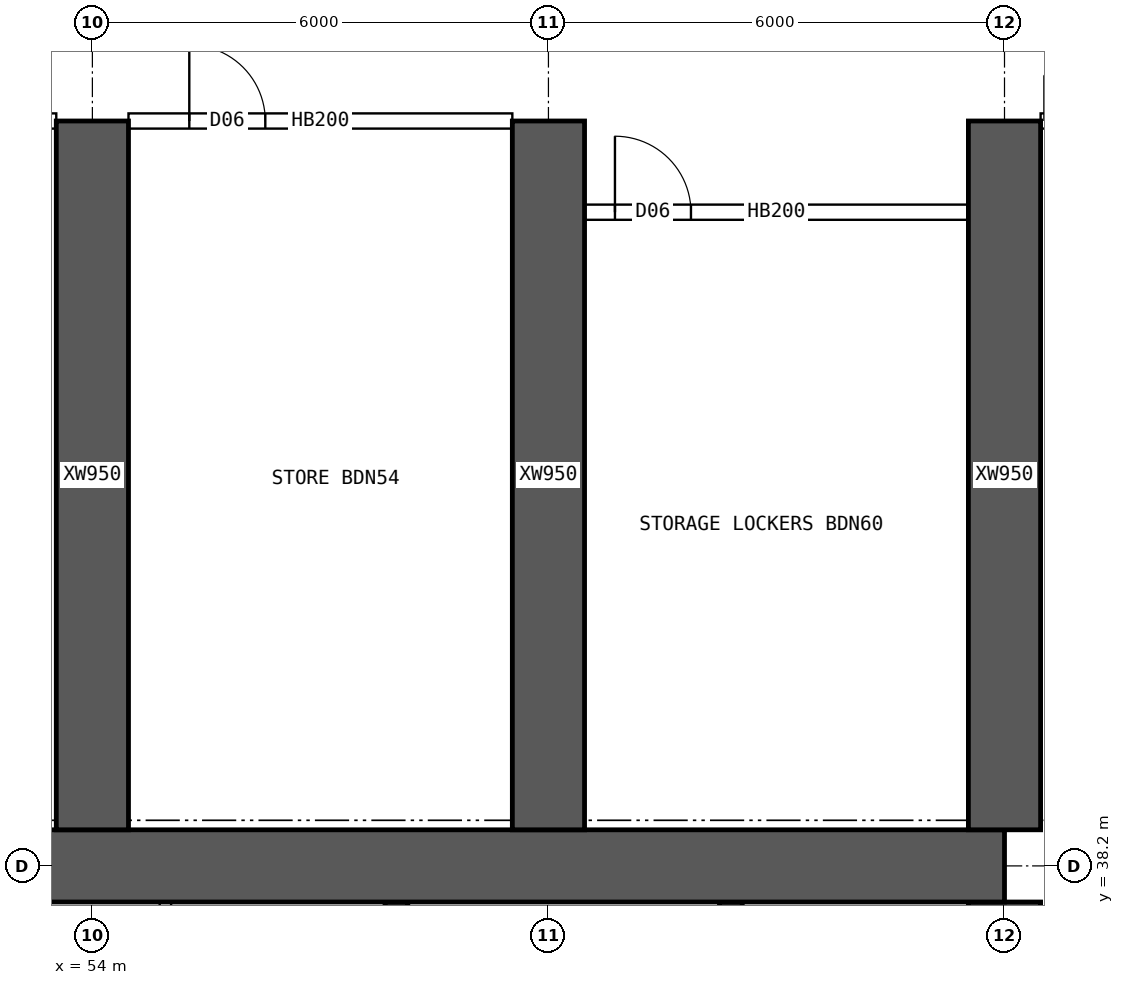
"""IFC4 building model, lengths in metres.
Left out: names, types, materials, properties, quantities, classifications, styles, units other than length and angle.
Written with IfcOpenShell. Run it as: python <this file> out.ifc"""

import sys

from ifc_helpers import new_model, si_unit, direction, frame, frame_2d, origin, place, context, subcontext, project, spatial, rectangle, extrude, element, fill, save


model = new_model("IFC4")
c1 = context("Model", 3, precision=1e-05, world=origin(), true_north=direction((0.0, 1.0)))
c2 = subcontext(c1, "Body", "Model", "MODEL_VIEW")
j1 = project(units=[si_unit("LENGTHUNIT", "METRE"), si_unit("PLANEANGLEUNIT", "RADIAN")], contexts=[c1])
p1 = place(None, origin())
s1 = spatial("IfcSite", under=j1, at=p1, CompositionType="ELEMENT")
p2 = place(p1, origin())
s2 = spatial("IfcBuilding", under=s1, at=p2, CompositionType="ELEMENT")
p3 = place(p2, frame((0.0, 0.0, 95.65)))
s3 = spatial("IfcBuildingStorey", under=s2, at=p3, CompositionType="ELEMENT", Elevation=95.65)
p4 = place(p3, frame((18.0, 38.2, 0.0), z_axis=(0.0, 0.0, 1.0), x_axis=(1.0, 0.0, 0.0)))
e1 = element("IfcWall", 1, at=p4, inside=s3, PredefinedType="SHEAR", context=c2, shape_type="SweptSolid", body=[
    extrude(rectangle(XDim=48.0, YDim=0.95, at=frame_2d((24.0, 0.0))), origin(), (0.0, 0.0, 1.0), 3.75),
])
p5 = place(p3, frame((66.0, 26.275, 0.0), z_axis=(0.0, 0.0, 1.0), x_axis=(0.0, 1.0, 0.0)))
e2 = element("IfcWall", 2, at=p5, inside=s3, PredefinedType="SHEAR", context=c2, shape_type="SweptSolid", body=[
    extrude(rectangle(XDim=11.45, YDim=0.95, at=frame_2d((5.725, 0.0))), origin(), (0.0, 0.0, 1.0), 3.75),
])
p6 = place(p5, frame((5.025, 0.0, 0.0)))
e3 = element("IfcOpeningElement", 3, at=p6, cuts=e2, PredefinedType="OPENING", context=c2, shape_type="SweptSolid", body=[
    extrude(rectangle(XDim=1.2, YDim=2.1, at=frame_2d((0.6, 1.05))), frame((0.0, 0.485, 0.0), z_axis=(0.0, -1.0, 0.0), x_axis=(1.0, 0.0, 0.0)), (0.0, 0.0, 1.0), 0.97),
])
for number, where, z_axis, x_axis in (
    (4, (62.4, 34.75, 0.0), (0.0, 0.0, 1.0), (0.0, 1.0, 0.0)),
    (5, (58.0, 34.75, 0.0), (0.0, 0.0, 1.0), (0.0, 1.0, 0.0)),
):
    element("IfcWall", number, at=place(p3, frame(where, z_axis=z_axis, x_axis=x_axis)), inside=s3, PredefinedType="SHEAR", context=c2, shape_type="SweptSolid", body=[
        extrude(rectangle(XDim=2.975, YDim=0.3, at=frame_2d((1.488, 0.0))), origin(), (0.0, 0.0, 1.0), 3.75),
    ])
for number, where, z_axis, x_axis in (
    (6, (54.0, 38.675, 0.0), (0.0, 0.0, 1.0), (0.0, 1.0, 0.0)),
    (7, (60.0, 38.675, 0.0), (0.0, 0.0, 1.0), (0.0, 1.0, 0.0)),
    (8, (66.0, 38.675, 0.0), (0.0, 0.0, 1.0), (0.0, 1.0, 0.0)),
):
    element("IfcWall", number, at=place(p3, frame(where, z_axis=z_axis, x_axis=x_axis)), inside=s3, PredefinedType="SHEAR", context=c2, shape_type="SweptSolid", body=[
        extrude(rectangle(XDim=9.325, YDim=0.95, at=frame_2d((4.663, 0.0))), origin(), (0.0, 0.0, 1.0), 3.75),
    ])
p7 = place(p3, frame((54.961, 34.75, 0.0), z_axis=(0.0, 0.0, 1.0), x_axis=(0.0, 1.0, 0.0)))
e9 = element("IfcWall", 9, at=p7, inside=s3, PredefinedType="SOLIDWALL", context=c2, shape_type="SweptSolid", body=[
    extrude(rectangle(XDim=2.975, YDim=0.15, at=frame_2d((1.488, 0.0))), origin(), (0.0, 0.0, 1.0), 3.3),
])
p8 = place(p3, frame((48.475, 48.0, 0.0), z_axis=(0.0, 0.0, 1.0), x_axis=(1.0, 0.0, 0.0)))
e10 = element("IfcWall", 10, at=p8, inside=s3, PredefinedType="SOLIDWALL", context=c2, shape_type="SweptSolid", body=[
    extrude(rectangle(XDim=5.05, YDim=0.2, at=frame_2d((2.525, 0.0))), origin(), (0.0, 0.0, 1.0), 3.3),
])
p9 = place(p8, frame((0.15, 0.0, 0.0)))
e11 = element("IfcOpeningElement", 11, at=p9, cuts=e10, PredefinedType="OPENING", context=c2, shape_type="SweptSolid", body=[
    extrude(rectangle(XDim=0.9, YDim=2.1, at=frame_2d((0.45, 1.05))), frame((0.0, 0.11, 0.0), z_axis=(0.0, -1.0, 0.0), x_axis=(1.0, 0.0, 0.0)), (0.0, 0.0, 1.0), 0.22),
])
p10 = place(p8, frame((2.335, 0.0, 0.0)))
e12 = element("IfcOpeningElement", 12, at=p10, cuts=e10, PredefinedType="OPENING", context=c2, shape_type="SweptSolid", body=[
    extrude(rectangle(XDim=0.9, YDim=2.1, at=frame_2d((0.45, 1.05))), frame((0.0, 0.11, 0.0), z_axis=(0.0, -1.0, 0.0), x_axis=(1.0, 0.0, 0.0)), (0.0, 0.0, 1.0), 0.22),
])
p11 = place(p3, frame((54.475, 48.0, 0.0), z_axis=(0.0, 0.0, 1.0), x_axis=(1.0, 0.0, 0.0)))
e13 = element("IfcWall", 13, at=p11, inside=s3, PredefinedType="SOLIDWALL", context=c2, shape_type="SweptSolid", body=[
    extrude(rectangle(XDim=5.05, YDim=0.2, at=frame_2d((2.525, 0.0))), origin(), (0.0, 0.0, 1.0), 3.3),
])
p12 = place(p11, frame((0.8, 0.0, 0.0)))
e14 = element("IfcOpeningElement", 14, at=p12, cuts=e13, PredefinedType="OPENING", context=c2, shape_type="SweptSolid", body=[
    extrude(rectangle(XDim=1.0, YDim=2.1, at=frame_2d((0.5, 1.05))), frame((0.0, 0.11, 0.0), z_axis=(0.0, -1.0, 0.0), x_axis=(1.0, 0.0, 0.0)), (0.0, 0.0, 1.0), 0.22),
])
p13 = place(p3, frame((66.475, 48.0, 0.0), z_axis=(0.0, 0.0, 1.0), x_axis=(1.0, 0.0, 0.0)))
e15 = element("IfcWall", 15, at=p13, inside=s3, PredefinedType="SOLIDWALL", context=c2, shape_type="SweptSolid", body=[
    extrude(rectangle(XDim=1.925, YDim=0.2, at=frame_2d((0.962, 0.0))), origin(), (0.0, 0.0, 1.0), 3.3),
])
p14 = place(p13, frame((0.05, 0.0, 0.0)))
e16 = element("IfcOpeningElement", 16, at=p14, cuts=e15, PredefinedType="OPENING", context=c2, shape_type="SweptSolid", body=[
    extrude(rectangle(XDim=1.2, YDim=2.1, at=frame_2d((0.6, 1.05))), frame((0.0, 0.11, 0.0), z_axis=(0.0, -1.0, 0.0), x_axis=(1.0, 0.0, 0.0)), (0.0, 0.0, 1.0), 0.22),
])
p15 = place(p3, frame((60.475, 46.8, 0.0), z_axis=(0.0, 0.0, 1.0), x_axis=(1.0, 0.0, 0.0)))
e17 = element("IfcWall", 17, at=p15, inside=s3, PredefinedType="SOLIDWALL", context=c2, shape_type="SweptSolid", body=[
    extrude(rectangle(XDim=5.05, YDim=0.2, at=frame_2d((2.525, 0.0))), origin(), (0.0, 0.0, 1.0), 3.3),
])
p16 = place(p15, frame((0.4, 0.0, 0.0)))
e18 = element("IfcOpeningElement", 18, at=p16, cuts=e17, PredefinedType="OPENING", context=c2, shape_type="SweptSolid", body=[
    extrude(rectangle(XDim=1.0, YDim=2.1, at=frame_2d((0.5, 1.05))), frame((0.0, 0.11, 0.0), z_axis=(0.0, -1.0, 0.0), x_axis=(1.0, 0.0, 0.0)), (0.0, 0.0, 1.0), 0.22),
])
p17 = place(p12, origin())
e19 = element("IfcDoor", 19, at=p17, inside=s3, OperationType="SINGLE_SWING_LEFT", PredefinedType="DOOR", context=c2, shape_type="SweptSolid", body=[
    extrude(rectangle(XDim=1.0, YDim=2.1, at=frame_2d((0.5, 1.05))), frame((0.0, 0.025, 0.0), z_axis=(0.0, -1.0, 0.0), x_axis=(1.0, 0.0, 0.0)), (0.0, 0.0, 1.0), 0.05),
])
fill(e14, e19)
p18 = place(p16, origin())
e20 = element("IfcDoor", 20, at=p18, inside=s3, OperationType="SINGLE_SWING_LEFT", PredefinedType="DOOR", context=c2, shape_type="SweptSolid", body=[
    extrude(rectangle(XDim=1.0, YDim=2.1, at=frame_2d((0.5, 1.05))), frame((0.0, 0.025, 0.0), z_axis=(0.0, -1.0, 0.0), x_axis=(1.0, 0.0, 0.0)), (0.0, 0.0, 1.0), 0.05),
])
fill(e18, e20)
save(model, sys.argv[1])
